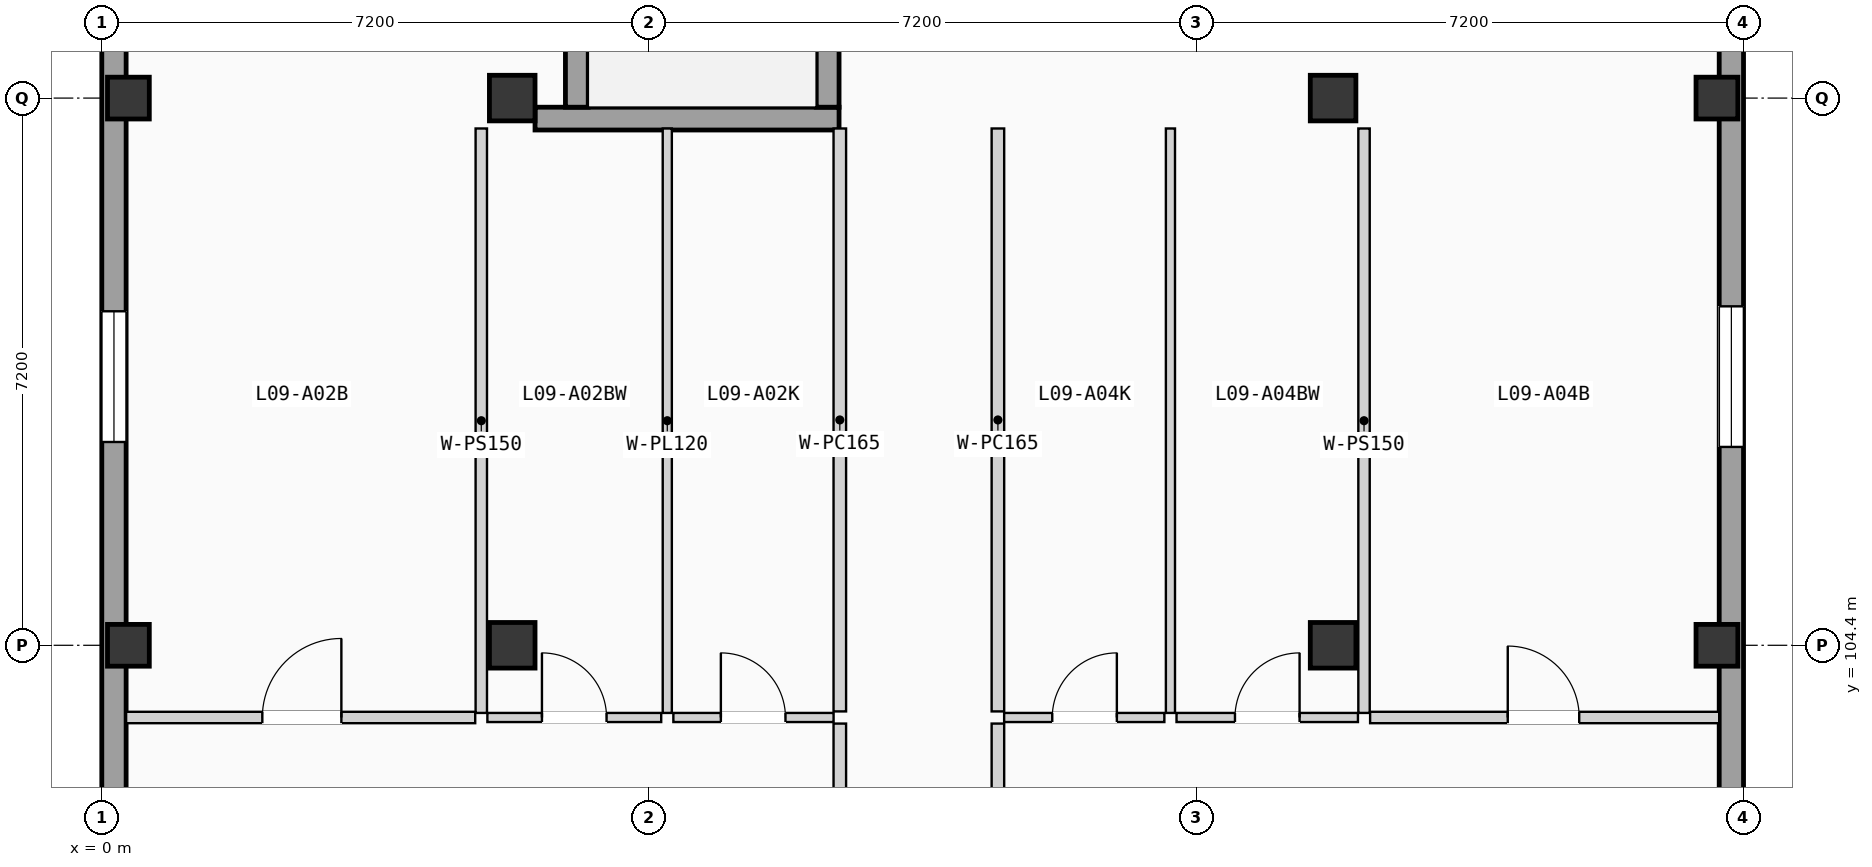
"""IFC4 building model, lengths in metres.
Left out: names, types, materials, properties, quantities, classifications, styles, units other than length and angle.
Written with IfcOpenShell. Run it as: python <this file> out.ifc"""

import sys

from ifc_helpers import new_model, si_unit, direction, frame, frame_2d, origin, origin_2d, place, context, subcontext, project, spatial, rectangle, extrude, element, fill, save


model = new_model("IFC4")
c1 = context("Model", 3, precision=1e-05, world=origin(), true_north=direction((0.0, 1.0)))
c2 = subcontext(c1, "Body", "Model", "MODEL_VIEW")
j1 = project(units=[si_unit("LENGTHUNIT", "METRE"), si_unit("PLANEANGLEUNIT", "RADIAN")], contexts=[c1])
p1 = place(None, origin())
s1 = spatial("IfcSite", under=j1, at=p1, CompositionType="ELEMENT")
p2 = place(p1, origin())
s2 = spatial("IfcBuilding", under=s1, at=p2, CompositionType="ELEMENT")
p3 = place(p2, frame((0.0, 0.0, 30.975)))
s3 = spatial("IfcBuildingStorey", under=s2, at=p3, CompositionType="ELEMENT", Elevation=30.975)
for number, where, z_axis, x_axis in (
    (1, (0.35, 104.4, 0.0), (0.0, 0.0, 1.0), (1.0, 0.0, 0.0)),
    (2, (0.35, 111.6, 0.0), (0.0, 0.0, 1.0), (1.0, 0.0, 0.0)),
):
    element("IfcColumn", number, at=place(p3, frame(where, z_axis=z_axis, x_axis=x_axis)), inside=s3, PredefinedType="COLUMN", context=c2, shape_type="SweptSolid", body=[
        extrude(rectangle(XDim=0.55, YDim=0.55, at=origin_2d()), origin(), (0.0, 0.0, 1.0), 3.15),
    ])
for number, where, z_axis, x_axis in (
    (3, (5.4, 104.4, 0.0), (0.0, 0.0, 1.0), (1.0, 0.0, 0.0)),
    (4, (5.4, 111.6, 0.0), (0.0, 0.0, 1.0), (1.0, 0.0, 0.0)),
    (5, (16.2, 104.4, 0.0), (0.0, 0.0, 1.0), (1.0, 0.0, 0.0)),
    (6, (16.2, 111.6, 0.0), (0.0, 0.0, 1.0), (1.0, 0.0, 0.0)),
):
    element("IfcColumn", number, at=place(p3, frame(where, z_axis=z_axis, x_axis=x_axis)), inside=s3, PredefinedType="COLUMN", context=c2, shape_type="SweptSolid", body=[
        extrude(rectangle(XDim=0.6, YDim=0.6, at=origin_2d()), origin(), (0.0, 0.0, 1.0), 3.15),
    ])
for number, where, z_axis, x_axis in (
    (7, (21.25, 104.4, 0.0), (0.0, 0.0, 1.0), (1.0, 0.0, 0.0)),
    (8, (21.25, 111.6, 0.0), (0.0, 0.0, 1.0), (1.0, 0.0, 0.0)),
):
    element("IfcColumn", number, at=place(p3, frame(where, z_axis=z_axis, x_axis=x_axis)), inside=s3, PredefinedType="COLUMN", context=c2, shape_type="SweptSolid", body=[
        extrude(rectangle(XDim=0.55, YDim=0.55, at=origin_2d()), origin(), (0.0, 0.0, 1.0), 3.15),
    ])
p4 = place(p3, frame((0.16, 68.72, 0.0), z_axis=(0.0, 0.0, 1.0), x_axis=(0.0, 1.0, 0.0)))
e9 = element("IfcWall", 9, at=p4, inside=s3, PredefinedType="SOLIDWALL", context=c2, shape_type="SweptSolid", body=[
    extrude(rectangle(XDim=49.76, YDim=0.32, at=frame_2d((24.88, 0.0))), origin(), (0.0, 0.0, 1.0), 2.9),
])
p5 = place(p4, frame((11.844, 0.0, 0.865)))
e10 = element("IfcOpeningElement", 10, at=p5, cuts=e9, PredefinedType="OPENING", context=c2, shape_type="SweptSolid", body=[
    extrude(rectangle(XDim=1.6, YDim=1.35, at=frame_2d((0.8, 0.675))), frame((0.0, 0.17, 0.0), z_axis=(0.0, -1.0, 0.0), x_axis=(1.0, 0.0, 0.0)), (0.0, 0.0, 1.0), 0.34),
])
p6 = place(p4, frame((8.499, 0.0, 0.715)))
e11 = element("IfcOpeningElement", 11, at=p6, cuts=e9, PredefinedType="OPENING", context=c2, shape_type="SweptSolid", body=[
    extrude(rectangle(XDim=1.6, YDim=1.5, at=frame_2d((0.8, 0.75))), frame((0.0, 0.17, 0.0), z_axis=(0.0, -1.0, 0.0), x_axis=(1.0, 0.0, 0.0)), (0.0, 0.0, 1.0), 0.34),
])
p7 = place(p4, frame((17.747, 0.0, 0.565)))
e12 = element("IfcOpeningElement", 12, at=p7, cuts=e9, PredefinedType="OPENING", context=c2, shape_type="SweptSolid", body=[
    extrude(rectangle(XDim=1.6, YDim=1.65, at=frame_2d((0.8, 0.825))), frame((0.0, 0.17, 0.0), z_axis=(0.0, -1.0, 0.0), x_axis=(1.0, 0.0, 0.0)), (0.0, 0.0, 1.0), 0.34),
])
p8 = place(p4, frame((31.225, 0.0, 0.85)))
e13 = element("IfcOpeningElement", 13, at=p8, cuts=e9, PredefinedType="OPENING", context=c2, shape_type="SweptSolid", body=[
    extrude(rectangle(XDim=0.95, YDim=1.2, at=frame_2d((0.475, 0.6))), frame((0.0, 0.17, 0.0), z_axis=(0.0, -1.0, 0.0), x_axis=(1.0, 0.0, 0.0)), (0.0, 0.0, 1.0), 0.34),
])
p9 = place(p4, frame((23.617, 0.0, 0.9)))
e14 = element("IfcOpeningElement", 14, at=p9, cuts=e9, PredefinedType="OPENING", context=c2, shape_type="SweptSolid", body=[
    extrude(rectangle(XDim=1.72, YDim=1.2, at=frame_2d((0.86, 0.6))), frame((0.0, 0.17, 0.0), z_axis=(0.0, -1.0, 0.0), x_axis=(1.0, 0.0, 0.0)), (0.0, 0.0, 1.0), 0.34),
])
p10 = place(p4, frame((38.355, 0.0, 0.865)))
e15 = element("IfcOpeningElement", 15, at=p10, cuts=e9, PredefinedType="OPENING", context=c2, shape_type="SweptSolid", body=[
    extrude(rectangle(XDim=1.72, YDim=1.35, at=frame_2d((0.86, 0.675))), frame((0.0, 0.17, 0.0), z_axis=(0.0, -1.0, 0.0), x_axis=(1.0, 0.0, 0.0)), (0.0, 0.0, 1.0), 0.34),
])
p11 = place(p3, frame((21.44, 68.72, 0.0), z_axis=(0.0, 0.0, 1.0), x_axis=(0.0, 1.0, 0.0)))
e16 = element("IfcWall", 16, at=p11, inside=s3, PredefinedType="SOLIDWALL", context=c2, shape_type="SweptSolid", body=[
    extrude(rectangle(XDim=49.76, YDim=0.32, at=frame_2d((24.88, 0.0))), origin(), (0.0, 0.0, 1.0), 2.9),
])
p12 = place(p11, frame((9.685, 0.0, 0.715)))
e17 = element("IfcOpeningElement", 17, at=p12, cuts=e16, PredefinedType="OPENING", context=c2, shape_type="SweptSolid", body=[
    extrude(rectangle(XDim=1.72, YDim=1.5, at=frame_2d((0.86, 0.75))), frame((0.0, 0.17, 0.0), z_axis=(0.0, -1.0, 0.0), x_axis=(1.0, 0.0, 0.0)), (0.0, 0.0, 1.0), 0.34),
])
p13 = place(p11, frame((16.598, 0.0, 0.565)))
e18 = element("IfcOpeningElement", 18, at=p13, cuts=e16, PredefinedType="OPENING", context=c2, shape_type="SweptSolid", body=[
    extrude(rectangle(XDim=1.72, YDim=1.65, at=frame_2d((0.86, 0.825))), frame((0.0, 0.17, 0.0), z_axis=(0.0, -1.0, 0.0), x_axis=(1.0, 0.0, 0.0)), (0.0, 0.0, 1.0), 0.34),
])
p14 = place(p11, frame((31.225, 0.0, 0.85)))
e19 = element("IfcOpeningElement", 19, at=p14, cuts=e16, PredefinedType="OPENING", context=c2, shape_type="SweptSolid", body=[
    extrude(rectangle(XDim=0.95, YDim=1.2, at=frame_2d((0.475, 0.6))), frame((0.0, 0.17, 0.0), z_axis=(0.0, -1.0, 0.0), x_axis=(1.0, 0.0, 0.0)), (0.0, 0.0, 1.0), 0.34),
])
p15 = place(p11, frame((23.552, 0.0, 0.9)))
e20 = element("IfcOpeningElement", 20, at=p15, cuts=e16, PredefinedType="OPENING", context=c2, shape_type="SweptSolid", body=[
    extrude(rectangle(XDim=1.85, YDim=1.2, at=frame_2d((0.925, 0.6))), frame((0.0, 0.17, 0.0), z_axis=(0.0, -1.0, 0.0), x_axis=(1.0, 0.0, 0.0)), (0.0, 0.0, 1.0), 0.34),
])
p16 = place(p11, frame((38.29, 0.0, 0.865)))
e21 = element("IfcOpeningElement", 21, at=p16, cuts=e16, PredefinedType="OPENING", context=c2, shape_type="SweptSolid", body=[
    extrude(rectangle(XDim=1.85, YDim=1.35, at=frame_2d((0.925, 0.675))), frame((0.0, 0.17, 0.0), z_axis=(0.0, -1.0, 0.0), x_axis=(1.0, 0.0, 0.0)), (0.0, 0.0, 1.0), 0.34),
])
p17 = place(p3, frame((5.7, 111.33, 0.0), z_axis=(0.0, 0.0, 1.0), x_axis=(1.0, 0.0, 0.0)))
e22 = element("IfcWall", 22, at=p17, inside=s3, PredefinedType="SHEAR", context=c2, shape_type="SweptSolid", body=[
    extrude(rectangle(XDim=4.0, YDim=0.3, at=frame_2d((2.0, 0.0))), origin(), (0.0, 0.0, 1.0), 2.9),
])
p18 = place(p3, frame((6.25, 111.48, 0.0), z_axis=(0.0, 0.0, 1.0), x_axis=(0.0, 1.0, 0.0)))
e23 = element("IfcWall", 23, at=p18, inside=s3, PredefinedType="SHEAR", context=c2, shape_type="SweptSolid", body=[
    extrude(rectangle(XDim=7.0, YDim=0.3, at=frame_2d((3.5, 0.0))), origin(), (0.0, 0.0, 1.0), 2.9),
])
p19 = place(p3, frame((9.55, 111.48, 0.0), z_axis=(0.0, 0.0, 1.0), x_axis=(0.0, 1.0, 0.0)))
e24 = element("IfcWall", 24, at=p19, inside=s3, PredefinedType="SHEAR", context=c2, shape_type="SweptSolid", body=[
    extrude(rectangle(XDim=7.0, YDim=0.3, at=frame_2d((3.5, 0.0))), origin(), (0.0, 0.0, 1.0), 2.9),
])
p20 = place(p19, frame((5.625, 0.0, 0.0)))
e25 = element("IfcOpeningElement", 25, at=p20, cuts=e24, PredefinedType="OPENING", context=c2, shape_type="SweptSolid", body=[
    extrude(rectangle(XDim=1.15, YDim=2.12, at=frame_2d((0.575, 1.06))), frame((0.0, 0.16, 0.0), z_axis=(0.0, -1.0, 0.0), x_axis=(1.0, 0.0, 0.0)), (0.0, 0.0, 1.0), 0.32),
])
p21 = place(p3, frame((9.71, 96.284, 0.0), z_axis=(0.0, 0.0, 1.0), x_axis=(0.0, 1.0, 0.0)))
e26 = element("IfcWall", 26, at=p21, inside=s3, PredefinedType="PARTITIONING", context=c2, shape_type="SweptSolid", body=[
    extrude(rectangle(XDim=7.086, YDim=0.165, at=frame_2d((3.543, 0.0))), origin(), (0.0, 0.0, 1.0), 2.87),
])
p22 = place(p21, frame((3.053, 0.0, 0.0)))
e27 = element("IfcOpeningElement", 27, at=p22, cuts=e26, PredefinedType="OPENING", context=c2, shape_type="SweptSolid", body=[
    extrude(rectangle(XDim=0.98, YDim=2.08, at=frame_2d((0.49, 1.04))), frame((0.0, 0.093, 0.0), z_axis=(0.0, -1.0, 0.0), x_axis=(1.0, 0.0, 0.0)), (0.0, 0.0, 1.0), 0.185),
])
p23 = place(p3, frame((9.71, 103.53, 0.0), z_axis=(0.0, 0.0, 1.0), x_axis=(0.0, 1.0, 0.0)))
e28 = element("IfcWall", 28, at=p23, inside=s3, PredefinedType="PARTITIONING", context=c2, shape_type="SweptSolid", body=[
    extrude(rectangle(XDim=7.67, YDim=0.165, at=frame_2d((3.835, 0.0))), origin(), (0.0, 0.0, 1.0), 2.87),
])
p24 = place(p3, frame((11.79, 96.284, 0.0), z_axis=(0.0, 0.0, 1.0), x_axis=(0.0, 1.0, 0.0)))
e29 = element("IfcWall", 29, at=p24, inside=s3, PredefinedType="PARTITIONING", context=c2, shape_type="SweptSolid", body=[
    extrude(rectangle(XDim=7.086, YDim=0.165, at=frame_2d((3.543, 0.0))), origin(), (0.0, 0.0, 1.0), 2.87),
])
p25 = place(p24, frame((3.053, 0.0, 0.0)))
e30 = element("IfcOpeningElement", 30, at=p25, cuts=e29, PredefinedType="OPENING", context=c2, shape_type="SweptSolid", body=[
    extrude(rectangle(XDim=0.98, YDim=2.08, at=frame_2d((0.49, 1.04))), frame((0.0, 0.093, 0.0), z_axis=(0.0, -1.0, 0.0), x_axis=(1.0, 0.0, 0.0)), (0.0, 0.0, 1.0), 0.185),
])
p26 = place(p3, frame((11.79, 103.53, 0.0), z_axis=(0.0, 0.0, 1.0), x_axis=(0.0, 1.0, 0.0)))
e31 = element("IfcWall", 31, at=p26, inside=s3, PredefinedType="PARTITIONING", context=c2, shape_type="SweptSolid", body=[
    extrude(rectangle(XDim=7.67, YDim=0.165, at=frame_2d((3.835, 0.0))), origin(), (0.0, 0.0, 1.0), 2.87),
])
p27 = place(p3, frame((7.52, 103.45, 0.0), z_axis=(0.0, 0.0, 1.0), x_axis=(1.0, 0.0, 0.0)))
e32 = element("IfcWall", 32, at=p27, inside=s3, PredefinedType="PARTITIONING", context=c2, shape_type="SweptSolid", body=[
    extrude(rectangle(XDim=2.108, YDim=0.12, at=frame_2d((1.054, 0.0))), origin(), (0.0, 0.0, 1.0), 2.87),
])
p28 = place(p27, frame((0.625, 0.0, 0.0)))
e33 = element("IfcOpeningElement", 33, at=p28, cuts=e32, PredefinedType="OPENING", context=c2, shape_type="SweptSolid", body=[
    extrude(rectangle(XDim=0.85, YDim=2.01, at=frame_2d((0.425, 1.005))), frame((0.0, 0.07, 0.0), z_axis=(0.0, -1.0, 0.0), x_axis=(1.0, 0.0, 0.0)), (0.0, 0.0, 1.0), 0.14),
])
p29 = place(p3, frame((0.32, 103.45, 0.0), z_axis=(0.0, 0.0, 1.0), x_axis=(1.0, 0.0, 0.0)))
e34 = element("IfcWall", 34, at=p29, inside=s3, PredefinedType="PARTITIONING", context=c2, shape_type="SweptSolid", body=[
    extrude(rectangle(XDim=4.593, YDim=0.15, at=frame_2d((2.296, 0.0))), origin(), (0.0, 0.0, 1.0), 2.87),
])
p30 = place(p29, frame((1.792, 0.0, 0.0)))
e35 = element("IfcOpeningElement", 35, at=p30, cuts=e34, PredefinedType="OPENING", context=c2, shape_type="SweptSolid", body=[
    extrude(rectangle(XDim=1.04, YDim=2.08, at=frame_2d((0.52, 1.04))), frame((0.0, 0.085, 0.0), z_axis=(0.0, -1.0, 0.0), x_axis=(1.0, 0.0, 0.0)), (0.0, 0.0, 1.0), 0.17),
])
p31 = place(p3, frame((5.073, 103.45, 0.0), z_axis=(0.0, 0.0, 1.0), x_axis=(1.0, 0.0, 0.0)))
e36 = element("IfcWall", 36, at=p31, inside=s3, PredefinedType="PARTITIONING", context=c2, shape_type="SweptSolid", body=[
    extrude(rectangle(XDim=2.287, YDim=0.12, at=frame_2d((1.144, 0.0))), origin(), (0.0, 0.0, 1.0), 2.87),
])
p32 = place(p31, frame((0.718, 0.0, 0.0)))
e37 = element("IfcOpeningElement", 37, at=p32, cuts=e36, PredefinedType="OPENING", context=c2, shape_type="SweptSolid", body=[
    extrude(rectangle(XDim=0.85, YDim=2.01, at=frame_2d((0.425, 1.005))), frame((0.0, 0.07, 0.0), z_axis=(0.0, -1.0, 0.0), x_axis=(1.0, 0.0, 0.0)), (0.0, 0.0, 1.0), 0.14),
])
p33 = place(p3, frame((7.44, 103.51, 0.0), z_axis=(0.0, 0.0, 1.0), x_axis=(0.0, 1.0, 0.0)))
e38 = element("IfcWall", 38, at=p33, inside=s3, PredefinedType="PARTITIONING", context=c2, shape_type="SweptSolid", body=[
    extrude(rectangle(XDim=7.69, YDim=0.12, at=frame_2d((3.845, 0.0))), origin(), (0.0, 0.0, 1.0), 2.87),
])
p34 = place(p3, frame((4.993, 103.51, 0.0), z_axis=(0.0, 0.0, 1.0), x_axis=(0.0, 1.0, 0.0)))
e39 = element("IfcWall", 39, at=p34, inside=s3, PredefinedType="PARTITIONING", context=c2, shape_type="SweptSolid", body=[
    extrude(rectangle(XDim=7.69, YDim=0.15, at=frame_2d((3.845, 0.0))), origin(), (0.0, 0.0, 1.0), 2.87),
])
p35 = place(p3, frame((11.872, 103.45, 0.0), z_axis=(0.0, 0.0, 1.0), x_axis=(1.0, 0.0, 0.0)))
e40 = element("IfcWall", 40, at=p35, inside=s3, PredefinedType="PARTITIONING", context=c2, shape_type="SweptSolid", body=[
    extrude(rectangle(XDim=2.108, YDim=0.12, at=frame_2d((1.054, 0.0))), origin(), (0.0, 0.0, 1.0), 2.87),
])
p36 = place(p35, frame((0.633, 0.0, 0.0)))
e41 = element("IfcOpeningElement", 41, at=p36, cuts=e40, PredefinedType="OPENING", context=c2, shape_type="SweptSolid", body=[
    extrude(rectangle(XDim=0.85, YDim=2.01, at=frame_2d((0.425, 1.005))), frame((0.0, 0.07, 0.0), z_axis=(0.0, -1.0, 0.0), x_axis=(1.0, 0.0, 0.0)), (0.0, 0.0, 1.0), 0.14),
])
p37 = place(p3, frame((16.687, 103.45, 0.0), z_axis=(0.0, 0.0, 1.0), x_axis=(1.0, 0.0, 0.0)))
e42 = element("IfcWall", 42, at=p37, inside=s3, PredefinedType="PARTITIONING", context=c2, shape_type="SweptSolid", body=[
    extrude(rectangle(XDim=4.593, YDim=0.15, at=frame_2d((2.296, 0.0))), origin(), (0.0, 0.0, 1.0), 2.87),
])
p38 = place(p37, frame((1.811, 0.0, 0.0)))
e43 = element("IfcOpeningElement", 43, at=p38, cuts=e42, PredefinedType="OPENING", context=c2, shape_type="SweptSolid", body=[
    extrude(rectangle(XDim=0.94, YDim=2.06, at=frame_2d((0.47, 1.03))), frame((0.0, 0.085, 0.0), z_axis=(0.0, -1.0, 0.0), x_axis=(1.0, 0.0, 0.0)), (0.0, 0.0, 1.0), 0.17),
])
p39 = place(p3, frame((14.14, 103.45, 0.0), z_axis=(0.0, 0.0, 1.0), x_axis=(1.0, 0.0, 0.0)))
e44 = element("IfcWall", 44, at=p39, inside=s3, PredefinedType="PARTITIONING", context=c2, shape_type="SweptSolid", body=[
    extrude(rectangle(XDim=2.387, YDim=0.12, at=frame_2d((1.194, 0.0))), origin(), (0.0, 0.0, 1.0), 2.87),
])
p40 = place(p39, frame((0.769, 0.0, 0.0)))
e45 = element("IfcOpeningElement", 45, at=p40, cuts=e44, PredefinedType="OPENING", context=c2, shape_type="SweptSolid", body=[
    extrude(rectangle(XDim=0.85, YDim=2.01, at=frame_2d((0.425, 1.005))), frame((0.0, 0.07, 0.0), z_axis=(0.0, -1.0, 0.0), x_axis=(1.0, 0.0, 0.0)), (0.0, 0.0, 1.0), 0.14),
])
p41 = place(p3, frame((14.06, 103.51, 0.0), z_axis=(0.0, 0.0, 1.0), x_axis=(0.0, 1.0, 0.0)))
e46 = element("IfcWall", 46, at=p41, inside=s3, PredefinedType="PARTITIONING", context=c2, shape_type="SweptSolid", body=[
    extrude(rectangle(XDim=7.69, YDim=0.12, at=frame_2d((3.845, 0.0))), origin(), (0.0, 0.0, 1.0), 2.87),
])
p42 = place(p3, frame((16.607, 103.51, 0.0), z_axis=(0.0, 0.0, 1.0), x_axis=(0.0, 1.0, 0.0)))
e47 = element("IfcWall", 47, at=p42, inside=s3, PredefinedType="PARTITIONING", context=c2, shape_type="SweptSolid", body=[
    extrude(rectangle(XDim=7.69, YDim=0.15, at=frame_2d((3.845, 0.0))), origin(), (0.0, 0.0, 1.0), 2.87),
])
p43 = place(p10, origin())
e48 = element("IfcWindow", 48, at=p43, inside=s3, PartitioningType="DOUBLE_PANEL_VERTICAL", PredefinedType="WINDOW", context=c2, shape_type="SweptSolid", body=[
    extrude(rectangle(XDim=1.72, YDim=1.35, at=frame_2d((0.86, 0.675))), frame((0.0, 0.03, 0.0), z_axis=(0.0, -1.0, 0.0), x_axis=(1.0, 0.0, 0.0)), (0.0, 0.0, 1.0), 0.06),
])
fill(e15, e48)
p44 = place(p16, origin())
e49 = element("IfcWindow", 49, at=p44, inside=s3, PartitioningType="DOUBLE_PANEL_VERTICAL", PredefinedType="WINDOW", context=c2, shape_type="SweptSolid", body=[
    extrude(rectangle(XDim=1.85, YDim=1.35, at=frame_2d((0.925, 0.675))), frame((0.0, 0.03, 0.0), z_axis=(0.0, -1.0, 0.0), x_axis=(1.0, 0.0, 0.0)), (0.0, 0.0, 1.0), 0.06),
])
fill(e21, e49)
p45 = place(p28, origin())
e50 = element("IfcDoor", 50, at=p45, inside=s3, OperationType="SINGLE_SWING_LEFT", PredefinedType="DOOR", context=c2, shape_type="SweptSolid", body=[
    extrude(rectangle(XDim=0.85, YDim=2.01, at=frame_2d((0.425, 1.005))), frame((0.0, 0.025, 0.0), z_axis=(0.0, -1.0, 0.0), x_axis=(1.0, 0.0, 0.0)), (0.0, 0.0, 1.0), 0.05),
])
fill(e33, e50)
p46 = place(p30, origin())
e51 = element("IfcDoor", 51, at=p46, inside=s3, OperationType="SINGLE_SWING_RIGHT", PredefinedType="DOOR", context=c2, shape_type="SweptSolid", body=[
    extrude(rectangle(XDim=1.04, YDim=2.08, at=frame_2d((0.52, 1.04))), frame((0.0, 0.025, 0.0), z_axis=(0.0, -1.0, 0.0), x_axis=(1.0, 0.0, 0.0)), (0.0, 0.0, 1.0), 0.05),
])
fill(e35, e51)
p47 = place(p32, origin())
e52 = element("IfcDoor", 52, at=p47, inside=s3, OperationType="SINGLE_SWING_LEFT", PredefinedType="DOOR", context=c2, shape_type="SweptSolid", body=[
    extrude(rectangle(XDim=0.85, YDim=2.01, at=frame_2d((0.425, 1.005))), frame((0.0, 0.025, 0.0), z_axis=(0.0, -1.0, 0.0), x_axis=(1.0, 0.0, 0.0)), (0.0, 0.0, 1.0), 0.05),
])
fill(e37, e52)
p48 = place(p36, origin())
e53 = element("IfcDoor", 53, at=p48, inside=s3, OperationType="SINGLE_SWING_RIGHT", PredefinedType="DOOR", context=c2, shape_type="SweptSolid", body=[
    extrude(rectangle(XDim=0.85, YDim=2.01, at=frame_2d((0.425, 1.005))), frame((0.0, 0.025, 0.0), z_axis=(0.0, -1.0, 0.0), x_axis=(1.0, 0.0, 0.0)), (0.0, 0.0, 1.0), 0.05),
])
fill(e41, e53)
p49 = place(p38, origin())
e54 = element("IfcDoor", 54, at=p49, inside=s3, OperationType="SINGLE_SWING_LEFT", PredefinedType="DOOR", context=c2, shape_type="SweptSolid", body=[
    extrude(rectangle(XDim=0.94, YDim=2.06, at=frame_2d((0.47, 1.03))), frame((0.0, 0.025, 0.0), z_axis=(0.0, -1.0, 0.0), x_axis=(1.0, 0.0, 0.0)), (0.0, 0.0, 1.0), 0.05),
])
fill(e43, e54)
p50 = place(p40, origin())
e55 = element("IfcDoor", 55, at=p50, inside=s3, OperationType="SINGLE_SWING_RIGHT", PredefinedType="DOOR", context=c2, shape_type="SweptSolid", body=[
    extrude(rectangle(XDim=0.85, YDim=2.01, at=frame_2d((0.425, 1.005))), frame((0.0, 0.025, 0.0), z_axis=(0.0, -1.0, 0.0), x_axis=(1.0, 0.0, 0.0)), (0.0, 0.0, 1.0), 0.05),
])
fill(e45, e55)
save(model, sys.argv[1])
